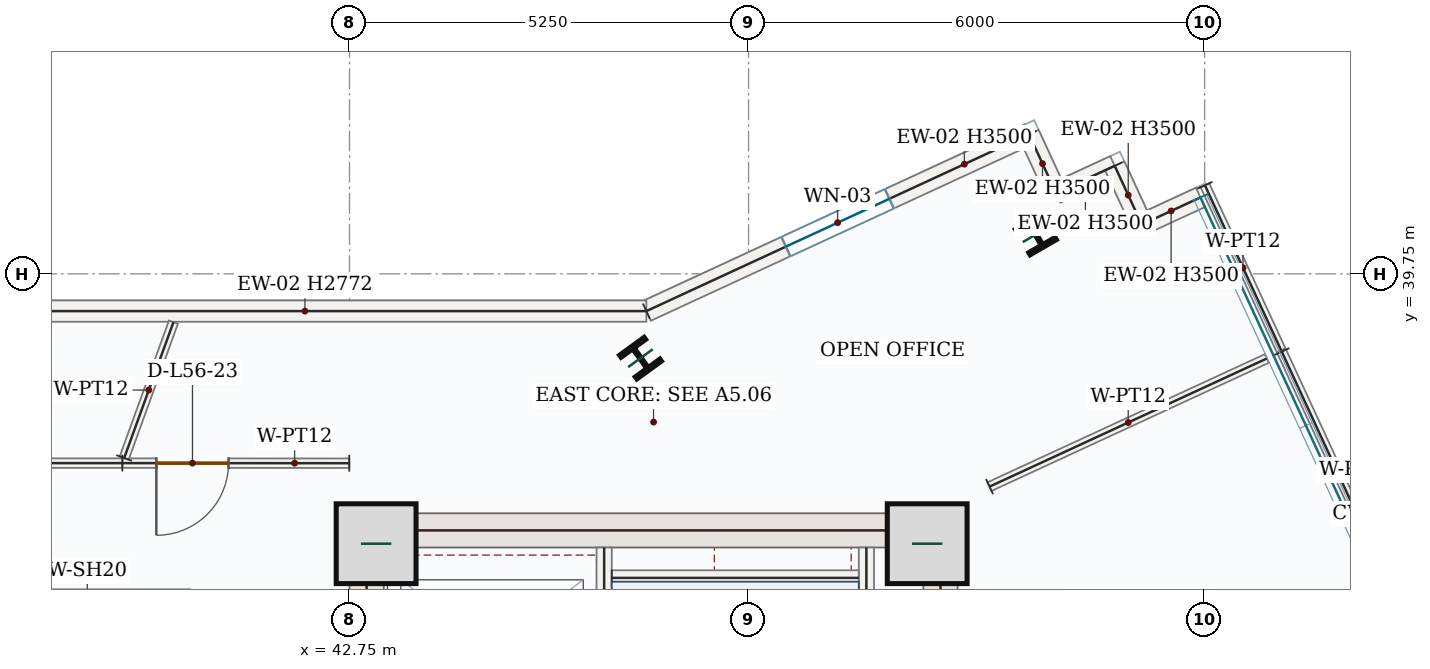
"""IFC4 building model, lengths in metres.
Left out: names, types, materials, properties, quantities, classifications, styles, units other than length and angle.
Written with IfcOpenShell. Run it as: python <this file> out.ifc"""

import sys

from ifc_helpers import new_model, si_unit, direction, frame, frame_2d, origin, origin_2d, place, context, subcontext, project, spatial, rectangle, i_section, extrude, source, transform, mapped, element, fill, save


model = new_model("IFC4")
c1 = context("Model", 3, precision=1e-05, world=origin(), true_north=direction((0.0, 1.0)))
c2 = subcontext(c1, "Body", "Model", "MODEL_VIEW")
j1 = project(units=[si_unit("LENGTHUNIT", "METRE"), si_unit("PLANEANGLEUNIT", "RADIAN")], contexts=[c1])
p1 = place(None, origin())
s1 = spatial("IfcSite", under=j1, at=p1, CompositionType="ELEMENT")
p2 = place(p1, origin())
s2 = spatial("IfcBuilding", under=s1, at=p2, CompositionType="ELEMENT")
p3 = place(p2, frame((0.0, 0.0, 239.1)))
s3 = spatial("IfcBuildingStorey", under=s2, at=p3, CompositionType="ELEMENT", Elevation=239.1)
p4 = place(p3, frame((42.975, 28.05, 0.0), z_axis=(0.0, 0.0, 1.0), x_axis=(0.0, 1.0, 0.0)))
e1 = element("IfcWall", 1, at=p4, inside=s3, PredefinedType="SHEAR", context=c2, shape_type="SweptSolid", body=[
    extrude(rectangle(XDim=8.55, YDim=0.45, at=frame_2d((4.275, 0.0))), origin(), (0.0, 0.0, 1.0), 3.5),
])
p5 = place(p4, frame((1.5, 0.0, 0.0)))
e2 = element("IfcOpeningElement", 2, at=p5, cuts=e1, PredefinedType="OPENING", context=c2, shape_type="SweptSolid", body=[
    extrude(rectangle(XDim=1.1, YDim=2.2, at=frame_2d((0.55, 1.1))), frame((0.0, 0.235, 0.0), z_axis=(0.0, -1.0, 0.0), x_axis=(1.0, 0.0, 0.0)), (0.0, 0.0, 1.0), 0.47),
])
m1 = source(origin(), c2, "Body", "SweptSolid", [
    extrude(rectangle(XDim=8.55, YDim=0.45, at=frame_2d((4.275, 0.0))), origin(), (0.0, 0.0, 1.0), 3.5),
])
p6 = place(p3, frame((50.525, 28.05, 0.0), z_axis=(0.0, 0.0, 1.0), x_axis=(0.0, 1.0, 0.0)))
e3 = element("IfcWall", 3, at=p6, inside=s3, PredefinedType="SHEAR", context=c2, shape_type="MappedRepresentation", body=[
    mapped(m1, transform((0.0, 0.0, 0.0), x_axis=(1.0, 0.0, 0.0), y_axis=(0.0, 1.0, 0.0), z_axis=(0.0, 0.0, 1.0), scale=1.0)),
])
m2 = source(origin(), c2, "Body", "SweptSolid", [
    extrude(rectangle(XDim=7.1, YDim=0.45, at=frame_2d((3.55, 0.0))), origin(), (0.0, 0.0, 1.0), 3.5),
])
p7 = place(p3, frame((43.2, 36.375, 0.0), z_axis=(0.0, 0.0, 1.0), x_axis=(1.0, 0.0, 0.0)))
e4 = element("IfcWall", 4, at=p7, inside=s3, PredefinedType="SHEAR", context=c2, shape_type="MappedRepresentation", body=[
    mapped(m2, transform((0.0, 0.0, 0.0), x_axis=(1.0, 0.0, 0.0), y_axis=(0.0, 1.0, 0.0), z_axis=(0.0, 0.0, 1.0), scale=1.0)),
])
m3 = source(origin(), c2, "Body", "SweptSolid", [
    extrude(rectangle(XDim=1.05, YDim=1.05, at=origin_2d()), origin(), (0.0, 0.0, 1.0), 3.75),
])
for number, where, z_axis, x_axis in (
    (5, (43.1, 36.2, 0.0), (0.0, 0.0, 1.0), (1.0, 0.0, 0.0)),
    (6, (50.35, 36.2, 0.0), (0.0, 0.0, 1.0), (1.0, 0.0, 0.0)),
):
    element("IfcColumn", number, at=place(p3, frame(where, z_axis=z_axis, x_axis=x_axis)), inside=s3, PredefinedType="COLUMN", context=c2, shape_type="MappedRepresentation", body=[
        mapped(m3, transform((0.0, 0.0, 0.0), x_axis=(1.0, 0.0, 0.0), y_axis=(0.0, 1.0, 0.0), z_axis=(0.0, 0.0, 1.0), scale=1.0)),
    ])
m4 = source(origin(), c2, "Body", "SweptSolid", [
    extrude(i_section(OverallWidth=0.399, OverallDepth=0.386, WebThickness=0.021, FlangeThickness=0.033, FilletRadius=0.018, at=origin_2d()), origin(), (0.0, 0.0, 1.0), 3.75),
])
for number, where, z_axis, x_axis in (
    (7, (46.578, 38.641, 0.0), (0.0, 0.0, 1.0), (0.809, 0.588, 0.0)),
    (8, (51.78, 40.268, 0.0), (0.0, 0.0, 1.0), (0.866, 0.5, 0.0)),
):
    element("IfcColumn", number, at=place(p3, frame(where, z_axis=z_axis, x_axis=x_axis)), inside=s3, PredefinedType="COLUMN", context=c2, shape_type="MappedRepresentation", body=[
        mapped(m4, transform((0.0, 0.0, 0.0), x_axis=(1.0, 0.0, 0.0), y_axis=(0.0, 1.0, 0.0), z_axis=(0.0, 0.0, 1.0), scale=1.0)),
    ])
p8 = place(p3, frame((46.655, 39.26, 0.0), z_axis=(0.0, 0.0, 1.0), x_axis=(0.907767275269, 0.419474163627, 0.0)))
e9 = element("IfcWall", 9, at=p8, inside=s3, PredefinedType="SOLIDWALL", context=c2, shape_type="SweptSolid", body=[
    extrude(rectangle(XDim=5.545, YDim=0.28, at=frame_2d((2.772, 0.0))), origin(), (0.0, 0.0, 1.0), 3.5),
])
p9 = place(p8, frame((2.022, 0.0, 0.85)))
e10 = element("IfcOpeningElement", 10, at=p9, cuts=e9, PredefinedType="OPENING", context=c2, shape_type="SweptSolid", body=[
    extrude(rectangle(XDim=1.5, YDim=1.5, at=frame_2d((0.75, 0.75))), frame((0.0, 0.15, 0.0), z_axis=(0.0, -1.0, 0.0), x_axis=(1.0, 0.0, 0.0)), (0.0, 0.0, 1.0), 0.3),
])
m5 = source(origin(), c2, "Body", "SweptSolid", [
    extrude(rectangle(XDim=0.85, YDim=0.28, at=frame_2d((0.425, 0.0))), origin(), (0.0, 0.0, 1.0), 3.5),
])
p10 = place(p3, frame((51.689, 41.586, 0.0), z_axis=(0.0, 0.0, 1.0), x_axis=(0.419549800563, -0.907732320041, 0.0)))
e11 = element("IfcWall", 11, at=p10, inside=s3, PredefinedType="SOLIDWALL", context=c2, shape_type="MappedRepresentation", body=[
    mapped(m5, transform((0.0, 0.0, 0.0), x_axis=(1.0, 0.0, 0.0), y_axis=(0.0, 1.0, 0.0), z_axis=(0.0, 0.0, 1.0), scale=1.0)),
])
m6 = source(origin(), c2, "Body", "SweptSolid", [
    extrude(rectangle(XDim=0.85, YDim=0.28, at=frame_2d((0.425, 0.0))), origin(), (0.0, 0.0, 1.0), 3.5),
])
p11 = place(p3, frame((52.045, 40.814, 0.0), z_axis=(0.0, 0.0, 1.0), x_axis=(0.907681752694, 0.41965919009, 0.0)))
e12 = element("IfcWall", 12, at=p11, inside=s3, PredefinedType="SOLIDWALL", context=c2, shape_type="MappedRepresentation", body=[
    mapped(m6, transform((0.0, 0.0, 0.0), x_axis=(1.0, 0.0, 0.0), y_axis=(0.0, 1.0, 0.0), z_axis=(0.0, 0.0, 1.0), scale=1.0)),
])
for number, where, z_axis, x_axis in (
    (13, (52.817, 41.171, 0.0), (0.0, 0.0, 1.0), (0.419, -0.908, 0.0)),
    (14, (53.173, 40.399, 0.0), (0.0, 0.0, 1.0), (0.908, 0.419, 0.0)),
):
    element("IfcWall", number, at=place(p3, frame(where, z_axis=z_axis, x_axis=x_axis)), inside=s3, PredefinedType="SOLIDWALL", context=c2, shape_type="MappedRepresentation", body=[
        mapped(m5, transform((0.0, 0.0, 0.0), x_axis=(1.0, 0.0, 0.0), y_axis=(0.0, 1.0, 0.0), z_axis=(0.0, 0.0, 1.0), scale=1.0)),
    ])
m7 = source(origin(), c2, "Body", "SweptSolid", [
    extrude(rectangle(XDim=8.984, YDim=0.28, at=frame_2d((4.492, 0.0))), origin(), (0.0, 0.0, 1.0), 2.772),
])
p12 = place(p3, frame((37.672, 39.26, 0.0), z_axis=(0.0, 0.0, 1.0), x_axis=(1.0, 0.0, 0.0)))
e15 = element("IfcWall", 15, at=p12, inside=s3, PredefinedType="SOLIDWALL", context=c2, shape_type="MappedRepresentation", body=[
    mapped(m7, transform((0.0, 0.0, 0.0), x_axis=(1.0, 0.0, 0.0), y_axis=(0.0, 1.0, 0.0), z_axis=(0.0, 0.0, 1.0), scale=1.0)),
])
m8 = source(origin(), c2, "Body", "SweptSolid", [
    extrude(rectangle(XDim=7.87, YDim=0.2, at=frame_2d((3.935, 0.0))), origin(), (0.0, 0.0, 1.0), 3.5),
])
p13 = place(p3, frame((49.55, 28.28, 0.0), z_axis=(0.0, 0.0, 1.0), x_axis=(0.0, 1.0, 0.0)))
e16 = element("IfcWall", 16, at=p13, inside=s3, PredefinedType="SOLIDWALL", context=c2, shape_type="MappedRepresentation", body=[
    mapped(m8, transform((0.0, 0.0, 0.0), x_axis=(1.0, 0.0, 0.0), y_axis=(0.0, 1.0, 0.0), z_axis=(0.0, 0.0, 1.0), scale=1.0)),
])
p14 = place(p3, frame((46.1, 28.15, 0.0), z_axis=(0.0, 0.0, 1.0), x_axis=(0.0, 1.0, 0.0)))
e17 = element("IfcWall", 17, at=p14, inside=s3, PredefinedType="SOLIDWALL", context=c2, shape_type="SweptSolid", body=[
    extrude(rectangle(XDim=8.0, YDim=0.2, at=frame_2d((4.0, 0.0))), origin(), (0.0, 0.0, 1.0), 3.5),
])
p15 = place(p14, frame((0.4, 0.0, 0.0)))
e18 = element("IfcOpeningElement", 18, at=p15, cuts=e17, PredefinedType="OPENING", context=c2, shape_type="SweptSolid", body=[
    extrude(rectangle(XDim=1.05, YDim=2.15, at=frame_2d((0.525, 1.075))), frame((0.0, 0.11, 0.0), z_axis=(0.0, -1.0, 0.0), x_axis=(1.0, 0.0, 0.0)), (0.0, 0.0, 1.0), 0.22),
])
m9 = source(origin(), c2, "Body", "SweptSolid", [
    extrude(rectangle(XDim=3.25, YDim=0.2, at=frame_2d((1.625, 0.0))), origin(), (0.0, 0.0, 1.0), 3.5),
])
p16 = place(p3, frame((46.2, 35.75, 0.0), z_axis=(0.0, 0.0, 1.0), x_axis=(1.0, 0.0, 0.0)))
e19 = element("IfcWall", 19, at=p16, inside=s3, PredefinedType="SOLIDWALL", context=c2, shape_type="MappedRepresentation", body=[
    mapped(m9, transform((0.0, 0.0, 0.0), x_axis=(1.0, 0.0, 0.0), y_axis=(0.0, 1.0, 0.0), z_axis=(0.0, 0.0, 1.0), scale=1.0)),
])
p17 = place(p3, frame((40.55, 33.2, 0.0), z_axis=(0.0, 0.0, 1.0), x_axis=(0.0, 1.0, 0.0)))
e20 = element("IfcWall", 20, at=p17, inside=s3, PredefinedType="SOLIDWALL", context=c2, shape_type="SweptSolid", body=[
    extrude(rectangle(XDim=2.4, YDim=0.2, at=frame_2d((1.2, 0.0))), origin(), (0.0, 0.0, 1.0), 3.5),
])
p18 = place(p17, frame((0.65, 0.0, 0.0)))
e21 = element("IfcOpeningElement", 21, at=p18, cuts=e20, PredefinedType="OPENING", context=c2, shape_type="SweptSolid", body=[
    extrude(rectangle(XDim=1.1, YDim=2.15, at=frame_2d((0.55, 1.075))), frame((0.0, 0.11, 0.0), z_axis=(0.0, -1.0, 0.0), x_axis=(1.0, 0.0, 0.0)), (0.0, 0.0, 1.0), 0.22),
])
m10 = source(origin(), c2, "Body", "SweptSolid", [
    extrude(rectangle(XDim=4.02, YDim=0.125, at=frame_2d((2.01, 0.0))), origin(), (0.0, 0.0, 1.0), 3.5),
])
p19 = place(p3, frame((51.17, 36.951, 0.0), z_axis=(0.0, 0.0, 1.0), x_axis=(0.907776222313, 0.419454801145, 0.0)))
e22 = element("IfcWall", 22, at=p19, inside=s3, PredefinedType="PARTITIONING", context=c2, shape_type="MappedRepresentation", body=[
    mapped(m10, transform((0.0, 0.0, 0.0), x_axis=(1.0, 0.0, 0.0), y_axis=(0.0, 1.0, 0.0), z_axis=(0.0, 0.0, 1.0), scale=1.0)),
])
m11 = source(origin(), c2, "Body", "SweptSolid", [
    extrude(rectangle(XDim=4.72, YDim=0.125, at=frame_2d((2.36, 0.0))), origin(), (0.0, 0.0, 1.0), 3.5),
])
p20 = place(p3, frame((55.015, 38.727, 0.0), z_axis=(0.0, 0.0, 1.0), x_axis=(0.419422223592, -0.907791274665, 0.0)))
e23 = element("IfcWall", 23, at=p20, inside=s3, PredefinedType="PARTITIONING", context=c2, shape_type="MappedRepresentation", body=[
    mapped(m11, transform((0.0, 0.0, 0.0), x_axis=(1.0, 0.0, 0.0), y_axis=(0.0, 1.0, 0.0), z_axis=(0.0, 0.0, 1.0), scale=1.0)),
])
p21 = place(p3, frame((42.747, 37.259, 0.0), z_axis=(0.0, 0.0, 1.0), x_axis=(-0.999999916415, 0.000408864141, 0.0)))
e24 = element("IfcWall", 24, at=p21, inside=s3, PredefinedType="PARTITIONING", context=c2, shape_type="SweptSolid", body=[
    extrude(rectangle(XDim=2.986, YDim=0.125, at=frame_2d((1.493, 0.0))), origin(), (0.0, 0.0, 1.0), 3.5),
])
p22 = place(p21, frame((1.588, 0.0, 0.0)))
e25 = element("IfcOpeningElement", 25, at=p22, cuts=e24, PredefinedType="OPENING", context=c2, shape_type="SweptSolid", body=[
    extrude(rectangle(XDim=0.95, YDim=2.15, at=frame_2d((0.475, 1.075))), frame((0.0, 0.073, 0.0), z_axis=(0.0, -1.0, 0.0), x_axis=(1.0, 0.0, 0.0)), (0.0, 0.0, 1.0), 0.145),
])
m12 = source(origin(), c2, "Body", "SweptSolid", [
    extrude(rectangle(XDim=1.901, YDim=0.125, at=frame_2d((0.951, 0.0))), origin(), (0.0, 0.0, 1.0), 3.5),
])
p23 = place(p3, frame((39.785, 37.327, 0.0), z_axis=(0.0, 0.0, 1.0), x_axis=(0.340887270823, 0.940104179648, 0.0)))
e26 = element("IfcWall", 26, at=p23, inside=s3, PredefinedType="PARTITIONING", context=c2, shape_type="MappedRepresentation", body=[
    mapped(m12, transform((0.0, 0.0, 0.0), x_axis=(1.0, 0.0, 0.0), y_axis=(0.0, 1.0, 0.0), z_axis=(0.0, 0.0, 1.0), scale=1.0)),
])
m13 = source(origin(), c2, "Body", "SweptSolid", [
    extrude(rectangle(XDim=2.39, YDim=0.125, at=frame_2d((1.195, 0.0))), origin(), (0.0, 0.0, 1.0), 3.5),
])
p24 = place(p3, frame((54.004, 40.915, 0.0), z_axis=(0.0, 0.0, 1.0), x_axis=(0.419459790898, -0.907773916688, 0.0)))
e27 = element("IfcWall", 27, at=p24, inside=s3, PredefinedType="PARTITIONING", context=c2, shape_type="MappedRepresentation", body=[
    mapped(m13, transform((0.0, 0.0, 0.0), x_axis=(1.0, 0.0, 0.0), y_axis=(0.0, 1.0, 0.0), z_axis=(0.0, 0.0, 1.0), scale=1.0)),
])
p25 = place(p3, frame((39.761, 37.26, 0.0), z_axis=(0.0, 0.0, 1.0), x_axis=(-1.0, 0.0, 0.0)))
e28 = element("IfcWall", 28, at=p25, inside=s3, PredefinedType="PARTITIONING", context=c2, shape_type="SweptSolid", body=[
    extrude(rectangle(XDim=6.221, YDim=0.125, at=frame_2d((3.111, 0.0))), origin(), (0.0, 0.0, 1.0), 3.5),
])
p26 = place(p25, frame((3.427, 0.0, 0.0)))
e29 = element("IfcOpeningElement", 29, at=p26, cuts=e28, PredefinedType="OPENING", context=c2, shape_type="SweptSolid", body=[
    extrude(rectangle(XDim=0.95, YDim=2.15, at=frame_2d((0.475, 1.075))), frame((0.0, 0.073, 0.0), z_axis=(0.0, -1.0, 0.0), x_axis=(1.0, 0.0, 0.0)), (0.0, 0.0, 1.0), 0.145),
])
m14 = source(origin(), c2, "Body", "SweptSolid", [
    extrude(rectangle(XDim=1.5, YDim=1.5, at=frame_2d((0.75, 0.75))), frame((0.0, 0.03, 0.0), z_axis=(0.0, -1.0, 0.0), x_axis=(1.0, 0.0, 0.0)), (0.0, 0.0, 1.0), 0.06),
])
p27 = place(p9, origin())
e30 = element("IfcWindow", 30, at=p27, inside=s3, PartitioningType="SINGLE_PANEL", PredefinedType="WINDOW", context=c2, shape_type="MappedRepresentation", body=[
    mapped(m14, transform((0.0, 0.0, 0.0), x_axis=(1.0, 0.0, 0.0), y_axis=(0.0, 1.0, 0.0), z_axis=(0.0, 0.0, 1.0), scale=1.0)),
])
fill(e10, e30)
m15 = source(origin(), c2, "Body", "SweptSolid", [
    extrude(rectangle(XDim=0.95, YDim=2.15, at=frame_2d((0.475, 1.075))), frame((0.0, 0.025, 0.0), z_axis=(0.0, -1.0, 0.0), x_axis=(1.0, 0.0, 0.0)), (0.0, 0.0, 1.0), 0.05),
])
p28 = place(p22, origin())
e31 = element("IfcDoor", 31, at=p28, inside=s3, OperationType="SINGLE_SWING_RIGHT", PredefinedType="DOOR", context=c2, shape_type="MappedRepresentation", body=[
    mapped(m15, transform((0.0, 0.0, 0.0), x_axis=(1.0, 0.0, 0.0), y_axis=(0.0, 1.0, 0.0), z_axis=(0.0, 0.0, 1.0), scale=1.0)),
])
fill(e25, e31)
save(model, sys.argv[1])
